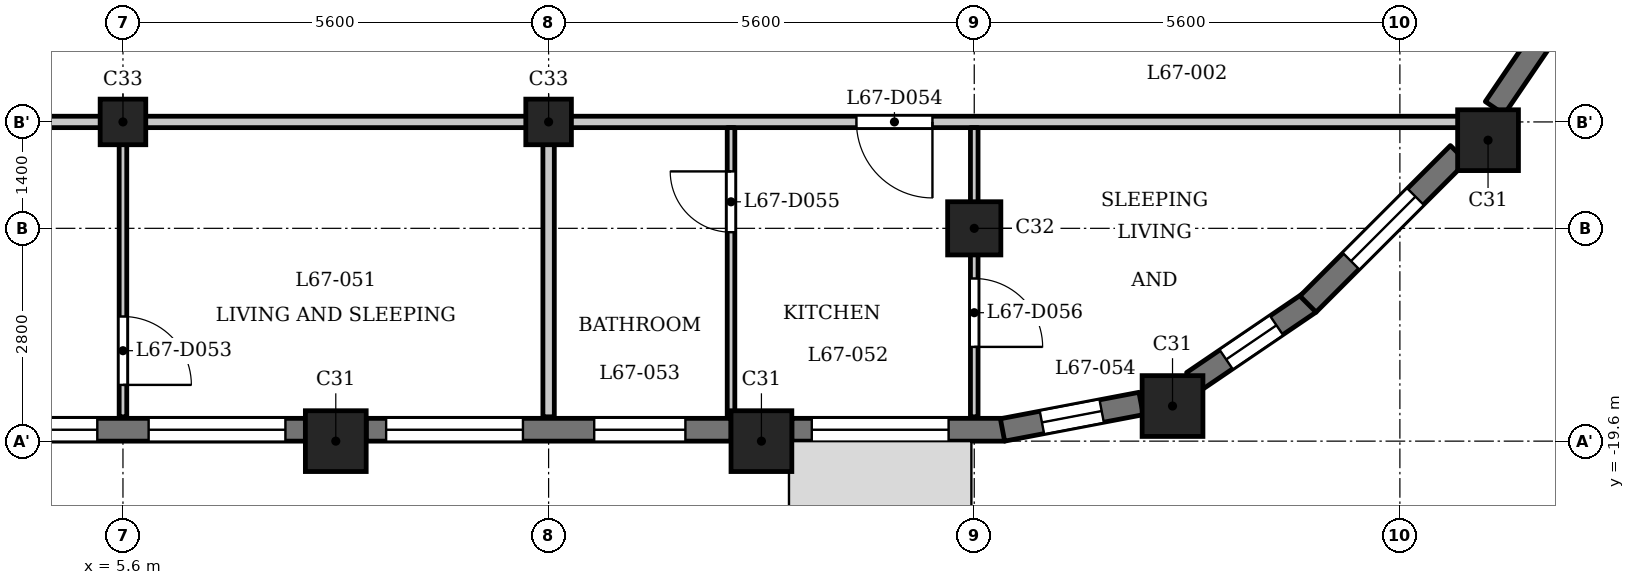
"""IFC4 building model, lengths in metres.
Left out: names, types, materials, properties, quantities, classifications, styles, units other than length and angle.
Written with IfcOpenShell. Run it as: python <this file> out.ifc"""

import sys

from ifc_helpers import new_model, si_unit, direction, frame, frame_2d, origin, origin_2d, place, context, subcontext, project, spatial, rectangle, extrude, element, fill, save


model = new_model("IFC4")
c1 = context("Model", 3, precision=1e-05, world=origin(), true_north=direction((0.0, 1.0)))
c2 = subcontext(c1, "Body", "Model", "MODEL_VIEW")
j1 = project(units=[si_unit("LENGTHUNIT", "METRE"), si_unit("PLANEANGLEUNIT", "RADIAN")], contexts=[c1])
p1 = place(None, origin())
s1 = spatial("IfcSite", under=j1, at=p1, CompositionType="ELEMENT")
p2 = place(p1, origin())
s2 = spatial("IfcBuilding", under=s1, at=p2, CompositionType="ELEMENT")
p3 = place(p2, frame((0.0, 0.0, 259.2)))
s3 = spatial("IfcBuildingStorey", under=s2, at=p3, CompositionType="ELEMENT", Elevation=259.2)
for number, where, z_axis, x_axis in (
    (1, (8.4, -19.6, 0.0), (0.0, 0.0, 1.0), (1.0, 0.0, 0.0)),
    (2, (14.0, -19.6, 0.0), (0.0, 0.0, 1.0), (1.0, 0.0, 0.0)),
    (3, (19.409, -19.138, 0.0), (0.0, 0.0, 1.0), (1.0, 0.0, 0.0)),
    (4, (23.56, -15.64, 0.0), (0.0, 0.0, 1.0), (1.0, 0.0, 0.0)),
):
    element("IfcColumn", number, at=place(p3, frame(where, z_axis=z_axis, x_axis=x_axis)), inside=s3, PredefinedType="COLUMN", context=c2, shape_type="SweptSolid", body=[
        extrude(rectangle(XDim=0.8, YDim=0.8, at=origin_2d()), origin(), (0.0, 0.0, 1.0), 3.5),
    ])
p4 = place(p3, frame((16.8, -16.8, 0.0), z_axis=(0.0, 0.0, 1.0), x_axis=(1.0, 0.0, 0.0)))
e5 = element("IfcColumn", 5, at=p4, inside=s3, PredefinedType="COLUMN", context=c2, shape_type="SweptSolid", body=[
    extrude(rectangle(XDim=0.7, YDim=0.7, at=origin_2d()), origin(), (0.0, 0.0, 1.0), 3.5),
])
for number, where, z_axis, x_axis in (
    (6, (5.6, -15.4, 0.0), (0.0, 0.0, 1.0), (1.0, 0.0, 0.0)),
    (7, (11.2, -15.4, 0.0), (0.0, 0.0, 1.0), (1.0, 0.0, 0.0)),
):
    element("IfcColumn", number, at=place(p3, frame(where, z_axis=z_axis, x_axis=x_axis)), inside=s3, PredefinedType="COLUMN", context=c2, shape_type="SweptSolid", body=[
        extrude(rectangle(XDim=0.6, YDim=0.6, at=origin_2d()), origin(), (0.0, 0.0, 1.0), 3.5),
    ])
p5 = place(p3, frame((3.2, -19.45, 0.0), z_axis=(0.0, 0.0, 1.0), x_axis=(1.0, 0.0, 0.0)))
e8 = element("IfcWall", 8, at=p5, inside=s3, PredefinedType="SOLIDWALL", context=c2, shape_type="SweptSolid", body=[
    extrude(rectangle(XDim=4.8, YDim=0.3, at=frame_2d((2.4, 0.0))), origin(), (0.0, 0.0, 1.0), 2.55),
])
p6 = place(p5, frame((0.262, 0.0, 0.9)))
e9 = element("IfcOpeningElement", 9, at=p6, cuts=e8, PredefinedType="OPENING", context=c2, shape_type="SweptSolid", body=[
    extrude(rectangle(XDim=1.8, YDim=1.25, at=frame_2d((0.9, 0.625))), frame((0.0, 0.16, 0.0), z_axis=(0.0, -1.0, 0.0), x_axis=(1.0, 0.0, 0.0)), (0.0, 0.0, 1.0), 0.32),
])
p7 = place(p5, frame((2.738, 0.0, 0.9)))
e10 = element("IfcOpeningElement", 10, at=p7, cuts=e8, PredefinedType="OPENING", context=c2, shape_type="SweptSolid", body=[
    extrude(rectangle(XDim=1.8, YDim=1.25, at=frame_2d((0.9, 0.625))), frame((0.0, 0.16, 0.0), z_axis=(0.0, -1.0, 0.0), x_axis=(1.0, 0.0, 0.0)), (0.0, 0.0, 1.0), 0.32),
])
p8 = place(p3, frame((8.8, -19.45, 0.0), z_axis=(0.0, 0.0, 1.0), x_axis=(1.0, 0.0, 0.0)))
e11 = element("IfcWall", 11, at=p8, inside=s3, PredefinedType="SOLIDWALL", context=c2, shape_type="SweptSolid", body=[
    extrude(rectangle(XDim=4.8, YDim=0.3, at=frame_2d((2.4, 0.0))), origin(), (0.0, 0.0, 1.0), 2.55),
])
p9 = place(p8, frame((0.262, 0.0, 0.9)))
e12 = element("IfcOpeningElement", 12, at=p9, cuts=e11, PredefinedType="OPENING", context=c2, shape_type="SweptSolid", body=[
    extrude(rectangle(XDim=1.8, YDim=1.25, at=frame_2d((0.9, 0.625))), frame((0.0, 0.16, 0.0), z_axis=(0.0, -1.0, 0.0), x_axis=(1.0, 0.0, 0.0)), (0.0, 0.0, 1.0), 0.32),
])
p10 = place(p8, frame((3.0, 0.0, 0.6)))
e13 = element("IfcOpeningElement", 13, at=p10, cuts=e11, PredefinedType="OPENING", context=c2, shape_type="SweptSolid", body=[
    extrude(rectangle(XDim=1.2, YDim=1.55, at=frame_2d((0.6, 0.775))), frame((0.0, 0.16, 0.0), z_axis=(0.0, -1.0, 0.0), x_axis=(1.0, 0.0, 0.0)), (0.0, 0.0, 1.0), 0.32),
])
p11 = place(p3, frame((14.4, -19.45, 0.0), z_axis=(0.0, 0.0, 1.0), x_axis=(1.0, 0.0, 0.0)))
e14 = element("IfcWall", 14, at=p11, inside=s3, PredefinedType="SOLIDWALL", context=c2, shape_type="SweptSolid", body=[
    extrude(rectangle(XDim=2.8, YDim=0.3, at=frame_2d((1.4, 0.0))), origin(), (0.0, 0.0, 1.0), 2.55),
])
p12 = place(p11, frame((0.262, 0.0, 0.9)))
e15 = element("IfcOpeningElement", 15, at=p12, cuts=e14, PredefinedType="OPENING", context=c2, shape_type="SweptSolid", body=[
    extrude(rectangle(XDim=1.8, YDim=1.25, at=frame_2d((0.9, 0.625))), frame((0.0, 0.16, 0.0), z_axis=(0.0, -1.0, 0.0), x_axis=(1.0, 0.0, 0.0)), (0.0, 0.0, 1.0), 0.32),
])
p13 = place(p3, frame((17.172, -19.453, 0.0), z_axis=(0.0, 0.0, 1.0), x_axis=(0.982301706131, 0.187305520826, 0.0)))
e16 = element("IfcWall", 16, at=p13, inside=s3, PredefinedType="SOLIDWALL", context=c2, shape_type="SweptSolid", body=[
    extrude(rectangle(XDim=1.856, YDim=0.3, at=frame_2d((0.928, 0.0))), origin(), (0.0, 0.0, 1.0), 2.55),
])
p14 = place(p13, frame((0.528, 0.0, 0.6)))
e17 = element("IfcOpeningElement", 17, at=p14, cuts=e16, PredefinedType="OPENING", context=c2, shape_type="SweptSolid", body=[
    extrude(rectangle(XDim=0.8, YDim=1.55, at=frame_2d((0.4, 0.775))), frame((0.0, 0.16, 0.0), z_axis=(0.0, -1.0, 0.0), x_axis=(1.0, 0.0, 0.0)), (0.0, 0.0, 1.0), 0.32),
])
p15 = place(p3, frame((19.678, -18.822, 0.0), z_axis=(0.0, 0.0, 1.0), x_axis=(0.826997446962, 0.562205676526, 0.0)))
e18 = element("IfcWall", 18, at=p15, inside=s3, PredefinedType="SOLIDWALL", context=c2, shape_type="SweptSolid", body=[
    extrude(rectangle(XDim=1.856, YDim=0.3, at=frame_2d((0.928, 0.0))), origin(), (0.0, 0.0, 1.0), 2.55),
])
p16 = place(p15, frame((0.528, 0.0, 0.6)))
e19 = element("IfcOpeningElement", 19, at=p16, cuts=e18, PredefinedType="OPENING", context=c2, shape_type="SweptSolid", body=[
    extrude(rectangle(XDim=0.8, YDim=1.55, at=frame_2d((0.4, 0.775))), frame((0.0, 0.16, 0.0), z_axis=(0.0, -1.0, 0.0), x_axis=(1.0, 0.0, 0.0)), (0.0, 0.0, 1.0), 0.32),
])
p17 = place(p3, frame((21.191, -17.797, 0.0), z_axis=(0.0, 0.0, 1.0), x_axis=(0.707106781187, 0.707106781187, 0.0)))
e20 = element("IfcWall", 20, at=p17, inside=s3, PredefinedType="SOLIDWALL", context=c2, shape_type="SweptSolid", body=[
    extrude(rectangle(XDim=2.8, YDim=0.3, at=frame_2d((1.4, 0.0))), origin(), (0.0, 0.0, 1.0), 2.55),
])
p18 = place(p17, frame((0.8, 0.0, 0.6)))
e21 = element("IfcOpeningElement", 21, at=p18, cuts=e20, PredefinedType="OPENING", context=c2, shape_type="SweptSolid", body=[
    extrude(rectangle(XDim=1.2, YDim=1.55, at=frame_2d((0.6, 0.775))), frame((0.0, 0.16, 0.0), z_axis=(0.0, -1.0, 0.0), x_axis=(1.0, 0.0, 0.0)), (0.0, 0.0, 1.0), 0.32),
])
p19 = place(p3, frame((23.648, -15.217, 0.0), z_axis=(0.0, 0.0, 1.0), x_axis=(0.562043265151, 0.827107833416, 0.0)))
e22 = element("IfcWall", 22, at=p19, inside=s3, PredefinedType="SOLIDWALL", context=c2, shape_type="SweptSolid", body=[
    extrude(rectangle(XDim=1.377, YDim=0.3, at=frame_2d((0.688, 0.0))), origin(), (0.0, 0.0, 1.0), 2.55),
])
p20 = place(p3, frame((-23.322, -15.4, 0.0), z_axis=(0.0, 0.0, 1.0), x_axis=(1.0, 0.0, 0.0)))
e23 = element("IfcWall", 23, at=p20, inside=s3, PredefinedType="PARTITIONING", context=c2, shape_type="SweptSolid", body=[
    extrude(rectangle(XDim=46.872, YDim=0.15, at=frame_2d((23.436, 0.0))), origin(), (0.0, 0.0, 1.0), 3.2),
])
p21 = place(p20, frame((7.172, 0.0, 0.0)))
e24 = element("IfcOpeningElement", 24, at=p21, cuts=e23, PredefinedType="OPENING", context=c2, shape_type="SweptSolid", body=[
    extrude(rectangle(XDim=1.0, YDim=2.1, at=frame_2d((0.5, 1.05))), frame((0.0, 0.085, 0.0), z_axis=(0.0, -1.0, 0.0), x_axis=(1.0, 0.0, 0.0)), (0.0, 0.0, 1.0), 0.17),
])
p22 = place(p20, frame((14.922, 0.0, 0.0)))
e25 = element("IfcOpeningElement", 25, at=p22, cuts=e23, PredefinedType="OPENING", context=c2, shape_type="SweptSolid", body=[
    extrude(rectangle(XDim=1.0, YDim=2.1, at=frame_2d((0.5, 1.05))), frame((0.0, 0.085, 0.0), z_axis=(0.0, -1.0, 0.0), x_axis=(1.0, 0.0, 0.0)), (0.0, 0.0, 1.0), 0.17),
])
p23 = place(p20, frame((26.372, 0.0, 0.0)))
e26 = element("IfcOpeningElement", 26, at=p23, cuts=e23, PredefinedType="OPENING", context=c2, shape_type="SweptSolid", body=[
    extrude(rectangle(XDim=1.0, YDim=2.1, at=frame_2d((0.5, 1.05))), frame((0.0, 0.085, 0.0), z_axis=(0.0, -1.0, 0.0), x_axis=(1.0, 0.0, 0.0)), (0.0, 0.0, 1.0), 0.17),
])
p24 = place(p20, frame((38.572, 0.0, 0.0)))
e27 = element("IfcOpeningElement", 27, at=p24, cuts=e23, PredefinedType="OPENING", context=c2, shape_type="SweptSolid", body=[
    extrude(rectangle(XDim=1.0, YDim=2.1, at=frame_2d((0.5, 1.05))), frame((0.0, 0.085, 0.0), z_axis=(0.0, -1.0, 0.0), x_axis=(1.0, 0.0, 0.0)), (0.0, 0.0, 1.0), 0.17),
])
p25 = place(p3, frame((5.6, -19.28, 0.0), z_axis=(0.0, 0.0, 1.0), x_axis=(0.0, 1.0, 0.0)))
e28 = element("IfcWall", 28, at=p25, inside=s3, PredefinedType="PARTITIONING", context=c2, shape_type="SweptSolid", body=[
    extrude(rectangle(XDim=3.805, YDim=0.1, at=frame_2d((1.902, 0.0))), origin(), (0.0, 0.0, 1.0), 3.2),
])
p26 = place(p25, frame((0.42, 0.0, 0.0)))
e29 = element("IfcOpeningElement", 29, at=p26, cuts=e28, PredefinedType="OPENING", context=c2, shape_type="SweptSolid", body=[
    extrude(rectangle(XDim=0.9, YDim=2.1, at=frame_2d((0.45, 1.05))), frame((0.0, 0.06, 0.0), z_axis=(0.0, -1.0, 0.0), x_axis=(1.0, 0.0, 0.0)), (0.0, 0.0, 1.0), 0.12),
])
p27 = place(p3, frame((11.2, -19.28, 0.0), z_axis=(0.0, 0.0, 1.0), x_axis=(0.0, 1.0, 0.0)))
e30 = element("IfcWall", 30, at=p27, inside=s3, PredefinedType="PARTITIONING", context=c2, shape_type="SweptSolid", body=[
    extrude(rectangle(XDim=3.805, YDim=0.15, at=frame_2d((1.902, 0.0))), origin(), (0.0, 0.0, 1.0), 3.2),
])
p28 = place(p3, frame((13.6, -19.28, 0.0), z_axis=(0.0, 0.0, 1.0), x_axis=(0.0, 1.0, 0.0)))
e31 = element("IfcWall", 31, at=p28, inside=s3, PredefinedType="PARTITIONING", context=c2, shape_type="SweptSolid", body=[
    extrude(rectangle(XDim=3.805, YDim=0.1, at=frame_2d((1.902, 0.0))), origin(), (0.0, 0.0, 1.0), 3.2),
])
p29 = place(p28, frame((2.429, 0.0, 0.0)))
e32 = element("IfcOpeningElement", 32, at=p29, cuts=e31, PredefinedType="OPENING", context=c2, shape_type="SweptSolid", body=[
    extrude(rectangle(XDim=0.8, YDim=2.1, at=frame_2d((0.4, 1.05))), frame((0.0, 0.06, 0.0), z_axis=(0.0, -1.0, 0.0), x_axis=(1.0, 0.0, 0.0)), (0.0, 0.0, 1.0), 0.12),
])
p30 = place(p3, frame((16.8, -19.28, 0.0), z_axis=(0.0, 0.0, 1.0), x_axis=(0.0, 1.0, 0.0)))
e33 = element("IfcWall", 33, at=p30, inside=s3, PredefinedType="PARTITIONING", context=c2, shape_type="SweptSolid", body=[
    extrude(rectangle(XDim=3.805, YDim=0.1, at=frame_2d((1.902, 0.0))), origin(), (0.0, 0.0, 1.0), 3.2),
])
p31 = place(p30, frame((0.92, 0.0, 0.0)))
e34 = element("IfcOpeningElement", 34, at=p31, cuts=e33, PredefinedType="OPENING", context=c2, shape_type="SweptSolid", body=[
    extrude(rectangle(XDim=0.9, YDim=2.1, at=frame_2d((0.45, 1.05))), frame((0.0, 0.06, 0.0), z_axis=(0.0, -1.0, 0.0), x_axis=(1.0, 0.0, 0.0)), (0.0, 0.0, 1.0), 0.12),
])
p32 = place(p26, origin())
e35 = element("IfcDoor", 35, at=p32, inside=s3, OperationType="SINGLE_SWING_LEFT", PredefinedType="DOOR", context=c2, shape_type="SweptSolid", body=[
    extrude(rectangle(XDim=0.9, YDim=2.1, at=frame_2d((0.45, 1.05))), frame((0.0, 0.025, 0.0), z_axis=(0.0, -1.0, 0.0), x_axis=(1.0, 0.0, 0.0)), (0.0, 0.0, 1.0), 0.05),
])
fill(e29, e35)
p33 = place(p24, origin())
e36 = element("IfcDoor", 36, at=p33, inside=s3, OperationType="SINGLE_SWING_RIGHT", PredefinedType="DOOR", context=c2, shape_type="SweptSolid", body=[
    extrude(rectangle(XDim=1.0, YDim=2.1, at=frame_2d((0.5, 1.05))), frame((0.0, 0.025, 0.0), z_axis=(0.0, -1.0, 0.0), x_axis=(1.0, 0.0, 0.0)), (0.0, 0.0, 1.0), 0.05),
])
fill(e27, e36)
p34 = place(p29, origin())
e37 = element("IfcDoor", 37, at=p34, inside=s3, OperationType="SINGLE_SWING_LEFT", PredefinedType="DOOR", context=c2, shape_type="SweptSolid", body=[
    extrude(rectangle(XDim=0.8, YDim=2.1, at=frame_2d((0.4, 1.05))), frame((0.0, 0.025, 0.0), z_axis=(0.0, -1.0, 0.0), x_axis=(1.0, 0.0, 0.0)), (0.0, 0.0, 1.0), 0.05),
])
fill(e32, e37)
p35 = place(p31, origin())
e38 = element("IfcDoor", 38, at=p35, inside=s3, OperationType="SINGLE_SWING_LEFT", PredefinedType="DOOR", context=c2, shape_type="SweptSolid", body=[
    extrude(rectangle(XDim=0.9, YDim=2.1, at=frame_2d((0.45, 1.05))), frame((0.0, 0.025, 0.0), z_axis=(0.0, -1.0, 0.0), x_axis=(1.0, 0.0, 0.0)), (0.0, 0.0, 1.0), 0.05),
])
fill(e34, e38)
p36 = place(p6, origin())
e39 = element("IfcWindow", 39, at=p36, inside=s3, PartitioningType="SINGLE_PANEL", PredefinedType="WINDOW", context=c2, shape_type="SweptSolid", body=[
    extrude(rectangle(XDim=1.8, YDim=1.25, at=frame_2d((0.9, 0.625))), frame((0.0, 0.03, 0.0), z_axis=(0.0, -1.0, 0.0), x_axis=(1.0, 0.0, 0.0)), (0.0, 0.0, 1.0), 0.06),
])
fill(e9, e39)
p37 = place(p7, origin())
e40 = element("IfcWindow", 40, at=p37, inside=s3, PartitioningType="SINGLE_PANEL", PredefinedType="WINDOW", context=c2, shape_type="SweptSolid", body=[
    extrude(rectangle(XDim=1.8, YDim=1.25, at=frame_2d((0.9, 0.625))), frame((0.0, 0.03, 0.0), z_axis=(0.0, -1.0, 0.0), x_axis=(1.0, 0.0, 0.0)), (0.0, 0.0, 1.0), 0.06),
])
fill(e10, e40)
p38 = place(p9, origin())
e41 = element("IfcWindow", 41, at=p38, inside=s3, PartitioningType="SINGLE_PANEL", PredefinedType="WINDOW", context=c2, shape_type="SweptSolid", body=[
    extrude(rectangle(XDim=1.8, YDim=1.25, at=frame_2d((0.9, 0.625))), frame((0.0, 0.03, 0.0), z_axis=(0.0, -1.0, 0.0), x_axis=(1.0, 0.0, 0.0)), (0.0, 0.0, 1.0), 0.06),
])
fill(e12, e41)
p39 = place(p10, origin())
e42 = element("IfcWindow", 42, at=p39, inside=s3, PartitioningType="SINGLE_PANEL", PredefinedType="WINDOW", context=c2, shape_type="SweptSolid", body=[
    extrude(rectangle(XDim=1.2, YDim=1.55, at=frame_2d((0.6, 0.775))), frame((0.0, 0.03, 0.0), z_axis=(0.0, -1.0, 0.0), x_axis=(1.0, 0.0, 0.0)), (0.0, 0.0, 1.0), 0.06),
])
fill(e13, e42)
p40 = place(p12, origin())
e43 = element("IfcWindow", 43, at=p40, inside=s3, PartitioningType="SINGLE_PANEL", PredefinedType="WINDOW", context=c2, shape_type="SweptSolid", body=[
    extrude(rectangle(XDim=1.8, YDim=1.25, at=frame_2d((0.9, 0.625))), frame((0.0, 0.03, 0.0), z_axis=(0.0, -1.0, 0.0), x_axis=(1.0, 0.0, 0.0)), (0.0, 0.0, 1.0), 0.06),
])
fill(e15, e43)
p41 = place(p14, origin())
e44 = element("IfcWindow", 44, at=p41, inside=s3, PartitioningType="SINGLE_PANEL", PredefinedType="WINDOW", context=c2, shape_type="SweptSolid", body=[
    extrude(rectangle(XDim=0.8, YDim=1.55, at=frame_2d((0.4, 0.775))), frame((0.0, 0.03, 0.0), z_axis=(0.0, -1.0, 0.0), x_axis=(1.0, 0.0, 0.0)), (0.0, 0.0, 1.0), 0.06),
])
fill(e17, e44)
p42 = place(p16, origin())
e45 = element("IfcWindow", 45, at=p42, inside=s3, PartitioningType="SINGLE_PANEL", PredefinedType="WINDOW", context=c2, shape_type="SweptSolid", body=[
    extrude(rectangle(XDim=0.8, YDim=1.55, at=frame_2d((0.4, 0.775))), frame((0.0, 0.03, 0.0), z_axis=(0.0, -1.0, 0.0), x_axis=(1.0, 0.0, 0.0)), (0.0, 0.0, 1.0), 0.06),
])
fill(e19, e45)
p43 = place(p18, origin())
e46 = element("IfcWindow", 46, at=p43, inside=s3, PartitioningType="SINGLE_PANEL", PredefinedType="WINDOW", context=c2, shape_type="SweptSolid", body=[
    extrude(rectangle(XDim=1.2, YDim=1.55, at=frame_2d((0.6, 0.775))), frame((0.0, 0.03, 0.0), z_axis=(0.0, -1.0, 0.0), x_axis=(1.0, 0.0, 0.0)), (0.0, 0.0, 1.0), 0.06),
])
fill(e21, e46)
save(model, sys.argv[1])
